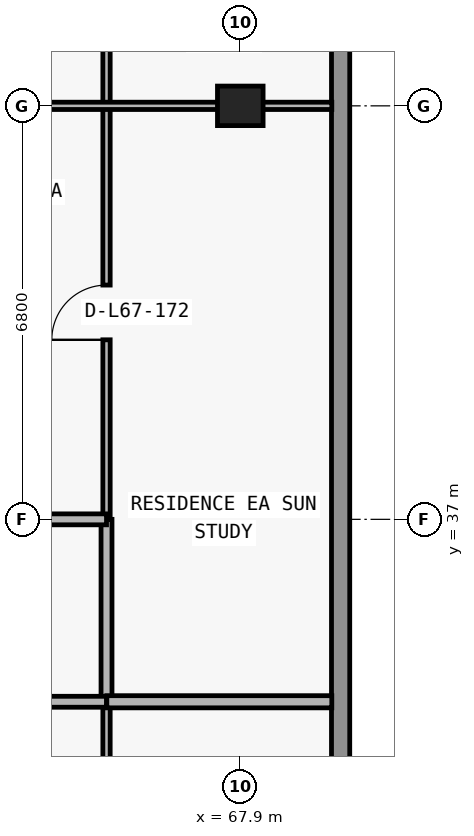
"""IFC4 building model, lengths in metres.
Left out: names, types, materials, properties, quantities, classifications, styles, units other than length and angle.
Written with IfcOpenShell. Run it as: python <this file> out.ifc"""

import sys

from ifc_helpers import new_model, si_unit, direction, frame, frame_2d, origin, origin_2d, place, context, subcontext, project, spatial, rectangle, extrude, element, fill, save


model = new_model("IFC4")
c1 = context("Model", 3, precision=1e-05, world=origin(), true_north=direction((0.0, 1.0)))
c2 = subcontext(c1, "Body", "Model", "MODEL_VIEW")
j1 = project(units=[si_unit("LENGTHUNIT", "METRE"), si_unit("PLANEANGLEUNIT", "RADIAN")], contexts=[c1])
p1 = place(None, origin())
s1 = spatial("IfcSite", under=j1, at=p1, CompositionType="ELEMENT")
p2 = place(p1, origin())
s2 = spatial("IfcBuilding", under=s1, at=p2, CompositionType="ELEMENT")
p3 = place(p2, frame((0.0, 0.0, 239.7)))
s3 = spatial("IfcBuildingStorey", under=s2, at=p3, CompositionType="ELEMENT", Elevation=239.7)
p4 = place(p3, frame((67.9, 43.8, 0.0), z_axis=(0.0, 0.0, 1.0), x_axis=(1.0, 0.0, 0.0)))
e1 = element("IfcColumn", 1, at=p4, inside=s3, PredefinedType="COLUMN", context=c2, shape_type="SweptSolid", body=[
    extrude(rectangle(XDim=0.75, YDim=0.65, at=origin_2d()), origin(), (0.0, 0.0, 1.0), 3.05),
])
p5 = place(p3, frame((69.55, 47.0, 0.0), z_axis=(0.0, 0.0, 1.0), x_axis=(0.0, -1.0, 0.0)))
e2 = element("IfcWall", 2, at=p5, inside=s3, PredefinedType="STANDARD", context=c2, shape_type="SweptSolid", body=[
    extrude(rectangle(XDim=16.85, YDim=0.3, at=frame_2d((8.425, 0.0))), origin(), (0.0, 0.0, 1.0), 3.05),
])
p6 = place(p3, frame((65.7, 29.44, 0.0), z_axis=(0.0, 0.0, 1.0), x_axis=(0.0, 1.0, 0.0)))
e3 = element("IfcWall", 3, at=p6, inside=s3, PredefinedType="PARTITIONING", context=c2, shape_type="SweptSolid", body=[
    extrude(rectangle(XDim=4.56, YDim=0.12, at=frame_2d((2.28, 0.0))), origin(), (0.0, 0.0, 1.0), 3.05),
])
p7 = place(p3, frame((65.7, 34.005, 0.0), z_axis=(0.0, 0.0, 1.0), x_axis=(0.0, 1.0, 0.0)))
e4 = element("IfcWall", 4, at=p7, inside=s3, PredefinedType="PARTITIONING", context=c2, shape_type="SweptSolid", body=[
    extrude(rectangle(XDim=2.995, YDim=0.18, at=frame_2d((1.498, 0.0))), origin(), (0.0, 0.0, 1.0), 3.05),
])
p8 = place(p3, frame((65.7, 37.005, 0.0), z_axis=(0.0, 0.0, 1.0), x_axis=(0.0, 1.0, 0.0)))
e5 = element("IfcWall", 5, at=p8, inside=s3, PredefinedType="PARTITIONING", context=c2, shape_type="SweptSolid", body=[
    extrude(rectangle(XDim=9.875, YDim=0.12, at=frame_2d((4.938, 0.0))), origin(), (0.0, 0.0, 1.0), 3.05),
])
p9 = place(p8, frame((2.948, 0.0, 0.0)))
e6 = element("IfcOpeningElement", 6, at=p9, cuts=e5, PredefinedType="OPENING", context=c2, shape_type="SweptSolid", body=[
    extrude(rectangle(XDim=0.9, YDim=2.15, at=frame_2d((0.45, 1.075))), frame((0.0, 0.07, 0.0), z_axis=(0.0, -1.0, 0.0), x_axis=(1.0, 0.0, 0.0)), (0.0, 0.0, 1.0), 0.14),
])
p10 = place(p8, frame((7.885, 0.0, 0.0)))
e7 = element("IfcOpeningElement", 7, at=p10, cuts=e5, PredefinedType="OPENING", context=c2, shape_type="SweptSolid", body=[
    extrude(rectangle(XDim=0.9, YDim=2.15, at=frame_2d((0.45, 1.075))), frame((0.0, 0.07, 0.0), z_axis=(0.0, -1.0, 0.0), x_axis=(1.0, 0.0, 0.0)), (0.0, 0.0, 1.0), 0.14),
])
p11 = place(p3, frame((12.105, 34.0, 0.0), z_axis=(0.0, 0.0, 1.0), x_axis=(1.0, 0.0, 0.0)))
e8 = element("IfcWall", 8, at=p11, inside=s3, PredefinedType="PARTITIONING", context=c2, shape_type="SweptSolid", body=[
    extrude(rectangle(XDim=53.595, YDim=0.18, at=frame_2d((26.797, 0.0))), origin(), (0.0, 0.0, 1.0), 3.05),
])
p12 = place(p11, frame((1.607, 0.0, 0.0)))
e9 = element("IfcOpeningElement", 9, at=p12, cuts=e8, PredefinedType="OPENING", context=c2, shape_type="SweptSolid", body=[
    extrude(rectangle(XDim=1.0, YDim=2.2, at=frame_2d((0.5, 1.1))), frame((0.0, 0.1, 0.0), z_axis=(0.0, -1.0, 0.0), x_axis=(1.0, 0.0, 0.0)), (0.0, 0.0, 1.0), 0.2),
])
p13 = place(p11, frame((17.057, 0.0, 0.0)))
e10 = element("IfcOpeningElement", 10, at=p13, cuts=e8, PredefinedType="OPENING", context=c2, shape_type="SweptSolid", body=[
    extrude(rectangle(XDim=1.0, YDim=2.2, at=frame_2d((0.5, 1.1))), frame((0.0, 0.1, 0.0), z_axis=(0.0, -1.0, 0.0), x_axis=(1.0, 0.0, 0.0)), (0.0, 0.0, 1.0), 0.2),
])
p14 = place(p11, frame((25.242, 0.0, 0.0)))
e11 = element("IfcOpeningElement", 11, at=p14, cuts=e8, PredefinedType="OPENING", context=c2, shape_type="SweptSolid", body=[
    extrude(rectangle(XDim=1.0, YDim=2.2, at=frame_2d((0.5, 1.1))), frame((0.0, 0.1, 0.0), z_axis=(0.0, -1.0, 0.0), x_axis=(1.0, 0.0, 0.0)), (0.0, 0.0, 1.0), 0.2),
])
p15 = place(p11, frame((33.092, 0.0, 0.0)))
e12 = element("IfcOpeningElement", 12, at=p15, cuts=e8, PredefinedType="OPENING", context=c2, shape_type="SweptSolid", body=[
    extrude(rectangle(XDim=1.0, YDim=2.2, at=frame_2d((0.5, 1.1))), frame((0.0, 0.1, 0.0), z_axis=(0.0, -1.0, 0.0), x_axis=(1.0, 0.0, 0.0)), (0.0, 0.0, 1.0), 0.2),
])
p16 = place(p11, frame((41.705, 0.0, 0.0)))
e13 = element("IfcOpeningElement", 13, at=p16, cuts=e8, PredefinedType="OPENING", context=c2, shape_type="SweptSolid", body=[
    extrude(rectangle(XDim=1.0, YDim=2.2, at=frame_2d((0.5, 1.1))), frame((0.0, 0.1, 0.0), z_axis=(0.0, -1.0, 0.0), x_axis=(1.0, 0.0, 0.0)), (0.0, 0.0, 1.0), 0.2),
])
p17 = place(p3, frame((65.705, 34.0, 0.0), z_axis=(0.0, 0.0, 1.0), x_axis=(1.0, 0.0, 0.0)))
e14 = element("IfcWall", 14, at=p17, inside=s3, PredefinedType="PARTITIONING", context=c2, shape_type="SweptSolid", body=[
    extrude(rectangle(XDim=3.7, YDim=0.2, at=frame_2d((1.85, 0.0))), origin(), (0.0, 0.0, 1.0), 3.05),
])
p18 = place(p3, frame((59.855, 37.0, 0.0), z_axis=(0.0, 0.0, 1.0), x_axis=(1.0, 0.0, 0.0)))
e15 = element("IfcWall", 15, at=p18, inside=s3, PredefinedType="PARTITIONING", context=c2, shape_type="SweptSolid", body=[
    extrude(rectangle(XDim=5.845, YDim=0.18, at=frame_2d((2.922, 0.0))), origin(), (0.0, 0.0, 1.0), 3.05),
])
p19 = place(p18, frame((3.57, 0.0, 0.0)))
e16 = element("IfcOpeningElement", 16, at=p19, cuts=e15, PredefinedType="OPENING", context=c2, shape_type="SweptSolid", body=[
    extrude(rectangle(XDim=1.0, YDim=2.2, at=frame_2d((0.5, 1.1))), frame((0.0, 0.1, 0.0), z_axis=(0.0, -1.0, 0.0), x_axis=(1.0, 0.0, 0.0)), (0.0, 0.0, 1.0), 0.2),
])
p20 = place(p3, frame((59.845, 43.8, 0.0), z_axis=(0.0, 0.0, 1.0), x_axis=(1.0, 0.0, 0.0)))
e17 = element("IfcWall", 17, at=p20, inside=s3, PredefinedType="PARTITIONING", context=c2, shape_type="SweptSolid", body=[
    extrude(rectangle(XDim=9.56, YDim=0.12, at=frame_2d((4.78, 0.0))), origin(), (0.0, 0.0, 1.0), 2.418),
])
p21 = place(p20, frame((3.63, 0.0, 0.0)))
e18 = element("IfcOpeningElement", 18, at=p21, cuts=e17, PredefinedType="OPENING", context=c2, shape_type="SweptSolid", body=[
    extrude(rectangle(XDim=0.9, YDim=2.15, at=frame_2d((0.45, 1.075))), frame((0.0, 0.07, 0.0), z_axis=(0.0, -1.0, 0.0), x_axis=(1.0, 0.0, 0.0)), (0.0, 0.0, 1.0), 0.14),
])
p22 = place(p20, frame((0.728, 0.0, 0.0)))
e19 = element("IfcOpeningElement", 19, at=p22, cuts=e17, PredefinedType="OPENING", context=c2, shape_type="SweptSolid", body=[
    extrude(rectangle(XDim=0.85, YDim=2.1, at=frame_2d((0.425, 1.05))), frame((0.0, 0.07, 0.0), z_axis=(0.0, -1.0, 0.0), x_axis=(1.0, 0.0, 0.0)), (0.0, 0.0, 1.0), 0.14),
])
p23 = place(p9, origin())
e20 = element("IfcDoor", 20, at=p23, inside=s3, OperationType="SINGLE_SWING_LEFT", PredefinedType="DOOR", context=c2, shape_type="SweptSolid", body=[
    extrude(rectangle(XDim=0.9, YDim=2.15, at=frame_2d((0.45, 1.075))), frame((0.0, 0.025, 0.0), z_axis=(0.0, -1.0, 0.0), x_axis=(1.0, 0.0, 0.0)), (0.0, 0.0, 1.0), 0.05),
])
fill(e6, e20)
save(model, sys.argv[1])
